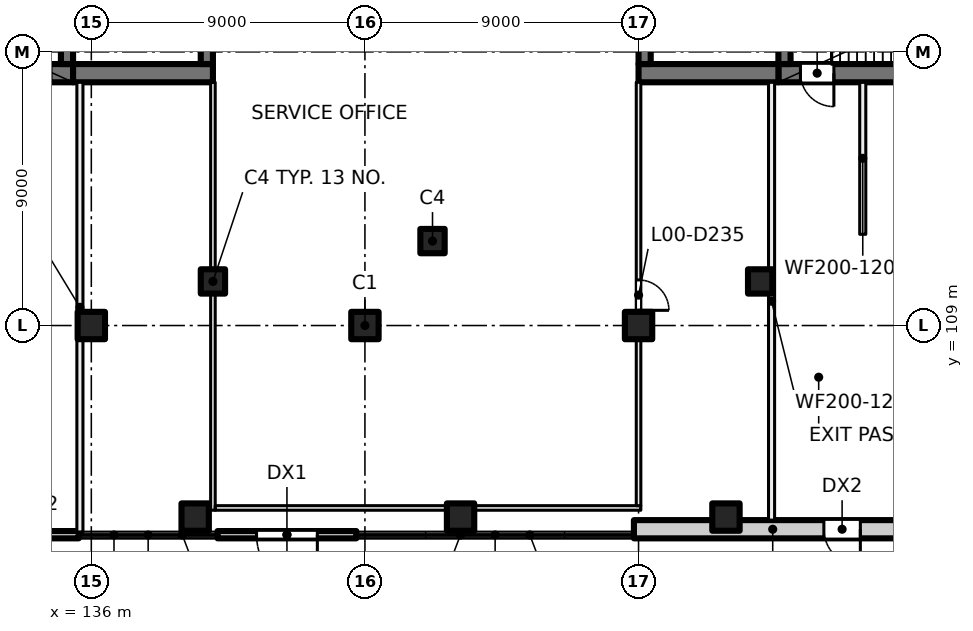
"""IFC4 building model, lengths in metres.
Left out: names, types, materials, properties, quantities, classifications, styles, units other than length and angle.
Written with IfcOpenShell. Run it as: python <this file> out.ifc"""

import sys

from ifc_helpers import new_model, si_unit, direction, frame, frame_2d, origin, origin_2d, place, context, subcontext, project, spatial, rectangle, extrude, element, fill, save


model = new_model("IFC4")
c1 = context("Model", 3, precision=1e-05, world=origin(), true_north=direction((0.0, 1.0)))
c2 = subcontext(c1, "Body", "Model", "MODEL_VIEW")
j1 = project(units=[si_unit("LENGTHUNIT", "METRE"), si_unit("PLANEANGLEUNIT", "RADIAN")], contexts=[c1])
p1 = place(None, origin())
s1 = spatial("IfcSite", under=j1, at=p1, CompositionType="ELEMENT")
p2 = place(p1, origin())
s2 = spatial("IfcBuilding", under=s1, at=p2, CompositionType="ELEMENT")
p3 = place(p2, origin())
s3 = spatial("IfcBuildingStorey", under=s2, at=p3, CompositionType="ELEMENT", Elevation=0.0)
for number, where, z_axis, x_axis in (
    (1, (136.0, 109.0, 0.0), (0.0, 0.0, 1.0), (1.0, 0.0, 0.0)),
    (2, (145.0, 109.0, 0.0), (0.0, 0.0, 1.0), (1.0, 0.0, 0.0)),
    (3, (154.0, 109.0, 0.0), (0.0, 0.0, 1.0), (1.0, 0.0, 0.0)),
    (4, (156.875, 102.7, 0.0), (0.0, 0.0, 1.0), (1.0, 0.0, 0.0)),
    (5, (148.146, 102.7, 0.0), (0.0, 0.0, 1.0), (1.0, 0.0, 0.0)),
    (6, (139.416, 102.7, 0.0), (0.0, 0.0, 1.0), (1.0, 0.0, 0.0)),
):
    element("IfcColumn", number, at=place(p3, frame(where, z_axis=z_axis, x_axis=x_axis)), inside=s3, PredefinedType="COLUMN", context=c2, shape_type="SweptSolid", body=[
        extrude(rectangle(XDim=0.9, YDim=0.9, at=origin_2d()), origin(), (0.0, 0.0, 1.0), 7.5),
    ])
for number, where, z_axis, x_axis in (
    (7, (140.0, 110.45, 0.0), (0.0, 0.0, 1.0), (1.0, 0.0, 0.0)),
    (8, (147.223, 111.777, 0.0), (0.0, 0.0, 1.0), (1.0, 0.0, 0.0)),
    (9, (158.0, 110.45, 0.0), (0.0, 0.0, 1.0), (1.0, 0.0, 0.0)),
):
    element("IfcColumn", number, at=place(p3, frame(where, z_axis=z_axis, x_axis=x_axis)), inside=s3, PredefinedType="COLUMN", context=c2, shape_type="SweptSolid", body=[
        extrude(rectangle(XDim=0.8, YDim=0.8, at=origin_2d()), origin(), (0.0, 0.0, 1.0), 7.5),
    ])
p4 = place(p3, frame((127.6, 117.3, 0.0), z_axis=(0.0, 0.0, 1.0), x_axis=(1.0, 0.0, 0.0)))
e10 = element("IfcWall", 10, at=p4, inside=s3, PredefinedType="SHEAR", context=c2, shape_type="SweptSolid", body=[
    extrude(rectangle(XDim=7.8, YDim=0.6, at=frame_2d((3.9, 0.0))), origin(), (0.0, 0.0, 1.0), 7.5),
])
p5 = place(p4, frame((5.975, 0.0, 0.0)))
e11 = element("IfcOpeningElement", 11, at=p5, cuts=e10, PredefinedType="OPENING", context=c2, shape_type="SweptSolid", body=[
    extrude(rectangle(XDim=1.1, YDim=2.1, at=frame_2d((0.55, 1.05))), frame((0.0, 0.31, 0.0), z_axis=(0.0, -1.0, 0.0), x_axis=(1.0, 0.0, 0.0)), (0.0, 0.0, 1.0), 0.62),
])
p6 = place(p3, frame((135.4, 117.3, 0.0), z_axis=(0.0, 0.0, 1.0), x_axis=(1.0, 0.0, 0.0)))
e12 = element("IfcWall", 12, at=p6, inside=s3, PredefinedType="SHEAR", context=c2, shape_type="SweptSolid", body=[
    extrude(rectangle(XDim=4.6, YDim=0.6, at=frame_2d((2.3, 0.0))), origin(), (0.0, 0.0, 1.0), 7.5),
])
p7 = place(p3, frame((135.2, 117.6, 0.0), z_axis=(0.0, 0.0, 1.0), x_axis=(0.0, 1.0, 0.0)))
e13 = element("IfcWall", 13, at=p7, inside=s3, PredefinedType="SHEAR", context=c2, shape_type="SweptSolid", body=[
    extrude(rectangle(XDim=2.8, YDim=0.4, at=frame_2d((1.4, 0.0))), origin(), (0.0, 0.0, 1.0), 7.5),
])
p8 = place(p7, frame((0.9, 0.0, 0.0)))
e14 = element("IfcOpeningElement", 14, at=p8, cuts=e13, PredefinedType="OPENING", context=c2, shape_type="SweptSolid", body=[
    extrude(rectangle(XDim=1.0, YDim=2.1, at=frame_2d((0.5, 1.05))), frame((0.0, 0.21, 0.0), z_axis=(0.0, -1.0, 0.0), x_axis=(1.0, 0.0, 0.0)), (0.0, 0.0, 1.0), 0.42),
])
p9 = place(p3, frame((139.8, 117.6, 0.0), z_axis=(0.0, 0.0, 1.0), x_axis=(0.0, 1.0, 0.0)))
e15 = element("IfcWall", 15, at=p9, inside=s3, PredefinedType="SHEAR", context=c2, shape_type="SweptSolid", body=[
    extrude(rectangle(XDim=8.6, YDim=0.4, at=frame_2d((4.3, 0.0))), origin(), (0.0, 0.0, 1.0), 7.5),
])
p10 = place(p3, frame((166.4, 117.3, 0.0), z_axis=(0.0, 0.0, 1.0), x_axis=(-1.0, 0.0, 0.0)))
e16 = element("IfcWall", 16, at=p10, inside=s3, PredefinedType="SHEAR", context=c2, shape_type="SweptSolid", body=[
    extrude(rectangle(XDim=7.8, YDim=0.6, at=frame_2d((3.9, 0.0))), origin(), (0.0, 0.0, 1.0), 7.5),
])
p11 = place(p10, frame((5.975, 0.0, 0.0)))
e17 = element("IfcOpeningElement", 17, at=p11, cuts=e16, PredefinedType="OPENING", context=c2, shape_type="SweptSolid", body=[
    extrude(rectangle(XDim=1.1, YDim=2.1, at=frame_2d((0.55, 1.05))), frame((0.0, 0.31, 0.0), z_axis=(0.0, -1.0, 0.0), x_axis=(1.0, 0.0, 0.0)), (0.0, 0.0, 1.0), 0.62),
])
p12 = place(p3, frame((158.6, 117.3, 0.0), z_axis=(0.0, 0.0, 1.0), x_axis=(-1.0, 0.0, 0.0)))
e18 = element("IfcWall", 18, at=p12, inside=s3, PredefinedType="SHEAR", context=c2, shape_type="SweptSolid", body=[
    extrude(rectangle(XDim=4.6, YDim=0.6, at=frame_2d((2.3, 0.0))), origin(), (0.0, 0.0, 1.0), 7.5),
])
p13 = place(p3, frame((158.8, 120.4, 0.0), z_axis=(0.0, 0.0, 1.0), x_axis=(0.0, -1.0, 0.0)))
e19 = element("IfcWall", 19, at=p13, inside=s3, PredefinedType="SHEAR", context=c2, shape_type="SweptSolid", body=[
    extrude(rectangle(XDim=2.8, YDim=0.4, at=frame_2d((1.4, 0.0))), origin(), (0.0, 0.0, 1.0), 7.5),
])
p14 = place(p13, frame((0.9, 0.0, 0.0)))
e20 = element("IfcOpeningElement", 20, at=p14, cuts=e19, PredefinedType="OPENING", context=c2, shape_type="SweptSolid", body=[
    extrude(rectangle(XDim=1.0, YDim=2.1, at=frame_2d((0.5, 1.05))), frame((0.0, 0.21, 0.0), z_axis=(0.0, -1.0, 0.0), x_axis=(1.0, 0.0, 0.0)), (0.0, 0.0, 1.0), 0.42),
])
p15 = place(p3, frame((154.2, 126.2, 0.0), z_axis=(0.0, 0.0, 1.0), x_axis=(0.0, -1.0, 0.0)))
e21 = element("IfcWall", 21, at=p15, inside=s3, PredefinedType="SHEAR", context=c2, shape_type="SweptSolid", body=[
    extrude(rectangle(XDim=8.6, YDim=0.4, at=frame_2d((4.3, 0.0))), origin(), (0.0, 0.0, 1.0), 7.5),
])
p16 = place(p3, frame((162.978, 102.3, 0.0), z_axis=(0.0, 0.0, 1.0), x_axis=(-1.0, 0.0, 0.0)))
e22 = element("IfcWall", 22, at=p16, inside=s3, PredefinedType="SOLIDWALL", context=c2, shape_type="SweptSolid", body=[
    extrude(rectangle(XDim=9.13, YDim=0.6, at=frame_2d((4.565, 0.0))), origin(), (0.0, 0.0, 1.0), 7.1),
])
p17 = place(p16, frame((1.683, 0.0, 0.0)))
e23 = element("IfcOpeningElement", 23, at=p17, cuts=e22, PredefinedType="OPENING", context=c2, shape_type="SweptSolid", body=[
    extrude(rectangle(XDim=1.2, YDim=2.4, at=frame_2d((0.6, 1.2))), frame((0.0, 0.31, 0.0), z_axis=(0.0, -1.0, 0.0), x_axis=(1.0, 0.0, 0.0)), (0.0, 0.0, 1.0), 0.62),
])
p18 = place(p3, frame((144.717, 102.12, 0.0), z_axis=(0.0, 0.0, 1.0), x_axis=(-1.0, 0.0, 0.0)))
e24 = element("IfcWall", 24, at=p18, inside=s3, PredefinedType="SOLIDWALL", context=c2, shape_type="SweptSolid", body=[
    extrude(rectangle(XDim=4.565, YDim=0.24, at=frame_2d((2.283, 0.0))), origin(), (0.0, 0.0, 1.0), 7.1),
])
p19 = place(p18, frame((1.283, 0.0, 0.0)))
e25 = element("IfcOpeningElement", 25, at=p19, cuts=e24, PredefinedType="OPENING", context=c2, shape_type="SweptSolid", body=[
    extrude(rectangle(XDim=2.0, YDim=2.5, at=frame_2d((1.0, 1.25))), frame((0.0, 0.13, 0.0), z_axis=(0.0, -1.0, 0.0), x_axis=(1.0, 0.0, 0.0)), (0.0, 0.0, 1.0), 0.26),
])
p20 = place(p3, frame((135.587, 102.12, 0.0), z_axis=(0.0, 0.0, 1.0), x_axis=(-1.0, 0.0, 0.0)))
e26 = element("IfcWall", 26, at=p20, inside=s3, PredefinedType="SOLIDWALL", context=c2, shape_type="SweptSolid", body=[
    extrude(rectangle(XDim=4.565, YDim=0.24, at=frame_2d((2.283, 0.0))), origin(), (0.0, 0.0, 1.0), 7.1),
])
p21 = place(p20, frame((1.683, 0.0, 0.0)))
e27 = element("IfcOpeningElement", 27, at=p21, cuts=e26, PredefinedType="OPENING", context=c2, shape_type="SweptSolid", body=[
    extrude(rectangle(XDim=1.2, YDim=2.4, at=frame_2d((0.6, 1.2))), frame((0.0, 0.13, 0.0), z_axis=(0.0, -1.0, 0.0), x_axis=(1.0, 0.0, 0.0)), (0.0, 0.0, 1.0), 0.26),
])
p22 = place(p3, frame((135.625, 102.2, 0.0), z_axis=(0.0, 0.0, 1.0), x_axis=(0.0, 1.0, 0.0)))
e28 = element("IfcWall", 28, at=p22, inside=s3, PredefinedType="PARTITIONING", context=c2, shape_type="SweptSolid", body=[
    extrude(rectangle(XDim=14.8, YDim=0.2, at=frame_2d((7.4, 0.0))), origin(), (0.0, 0.0, 1.0), 7.1),
])
p23 = place(p3, frame((140.0, 102.925, 0.0), z_axis=(0.0, 0.0, 1.0), x_axis=(0.0, 1.0, 0.0)))
e29 = element("IfcWall", 29, at=p23, inside=s3, PredefinedType="PARTITIONING", context=c2, shape_type="SweptSolid", body=[
    extrude(rectangle(XDim=14.075, YDim=0.15, at=frame_2d((7.038, 0.0))), origin(), (0.0, 0.0, 1.0), 7.1),
])
p24 = place(p3, frame((140.075, 103.0, 0.0), z_axis=(0.0, 0.0, 1.0), x_axis=(1.0, 0.0, 0.0)))
e30 = element("IfcWall", 30, at=p24, inside=s3, PredefinedType="PARTITIONING", context=c2, shape_type="SweptSolid", body=[
    extrude(rectangle(XDim=14.0, YDim=0.15, at=frame_2d((7.0, 0.0))), origin(), (0.0, 0.0, 1.0), 7.1),
])
p25 = place(p3, frame((154.0, 117.0, 0.0), z_axis=(0.0, 0.0, 1.0), x_axis=(0.0, -1.0, 0.0)))
e31 = element("IfcWall", 31, at=p25, inside=s3, PredefinedType="PARTITIONING", context=c2, shape_type="SweptSolid", body=[
    extrude(rectangle(XDim=13.925, YDim=0.15, at=frame_2d((6.962, 0.0))), origin(), (0.0, 0.0, 1.0), 7.1),
])
p26 = place(p25, frame((6.5, 0.0, 0.0)))
e32 = element("IfcOpeningElement", 32, at=p26, cuts=e31, PredefinedType="OPENING", context=c2, shape_type="SweptSolid", body=[
    extrude(rectangle(XDim=1.0, YDim=2.1, at=frame_2d((0.5, 1.05))), frame((0.0, 0.085, 0.0), z_axis=(0.0, -1.0, 0.0), x_axis=(1.0, 0.0, 0.0)), (0.0, 0.0, 1.0), 0.17),
])
p27 = place(p3, frame((158.375, 102.6, 0.0), z_axis=(0.0, 0.0, 1.0), x_axis=(0.0, 1.0, 0.0)))
e33 = element("IfcWall", 33, at=p27, inside=s3, PredefinedType="PARTITIONING", context=c2, shape_type="SweptSolid", body=[
    extrude(rectangle(XDim=14.4, YDim=0.2, at=frame_2d((7.2, 0.0))), origin(), (0.0, 0.0, 1.0), 7.1),
])
p28 = place(p3, frame((161.375, 112.0, 0.0), z_axis=(0.0, 0.0, 1.0), x_axis=(0.0, 1.0, 0.0)))
e34 = element("IfcWall", 34, at=p28, inside=s3, PredefinedType="PARTITIONING", context=c2, shape_type="SweptSolid", body=[
    extrude(rectangle(XDim=5.0, YDim=0.2, at=frame_2d((2.5, 0.0))), origin(), (0.0, 0.0, 1.0), 7.1),
])
p29 = place(p17, origin())
e35 = element("IfcDoor", 35, at=p29, inside=s3, OperationType="SINGLE_SWING_LEFT", PredefinedType="DOOR", context=c2, shape_type="SweptSolid", body=[
    extrude(rectangle(XDim=1.2, YDim=2.4, at=frame_2d((0.6, 1.2))), frame((0.0, 0.025, 0.0), z_axis=(0.0, -1.0, 0.0), x_axis=(1.0, 0.0, 0.0)), (0.0, 0.0, 1.0), 0.05),
])
fill(e23, e35)
p30 = place(p19, origin())
e36 = element("IfcDoor", 36, at=p30, inside=s3, OperationType="DOUBLE_DOOR_SINGLE_SWING", PredefinedType="DOOR", context=c2, shape_type="SweptSolid", body=[
    extrude(rectangle(XDim=2.0, YDim=2.5, at=frame_2d((1.0, 1.25))), frame((0.0, 0.025, 0.0), z_axis=(0.0, -1.0, 0.0), x_axis=(1.0, 0.0, 0.0)), (0.0, 0.0, 1.0), 0.05),
])
fill(e25, e36)
p31 = place(p11, origin())
e37 = element("IfcDoor", 37, at=p31, inside=s3, OperationType="SINGLE_SWING_LEFT", PredefinedType="DOOR", context=c2, shape_type="SweptSolid", body=[
    extrude(rectangle(XDim=1.1, YDim=2.1, at=frame_2d((0.55, 1.05))), frame((0.0, 0.025, 0.0), z_axis=(0.0, -1.0, 0.0), x_axis=(1.0, 0.0, 0.0)), (0.0, 0.0, 1.0), 0.05),
])
fill(e17, e37)
p32 = place(p26, origin())
e38 = element("IfcDoor", 38, at=p32, inside=s3, OperationType="SINGLE_SWING_RIGHT", PredefinedType="DOOR", context=c2, shape_type="SweptSolid", body=[
    extrude(rectangle(XDim=1.0, YDim=2.1, at=frame_2d((0.5, 1.05))), frame((0.0, 0.025, 0.0), z_axis=(0.0, -1.0, 0.0), x_axis=(1.0, 0.0, 0.0)), (0.0, 0.0, 1.0), 0.05),
])
fill(e32, e38)
save(model, sys.argv[1])
